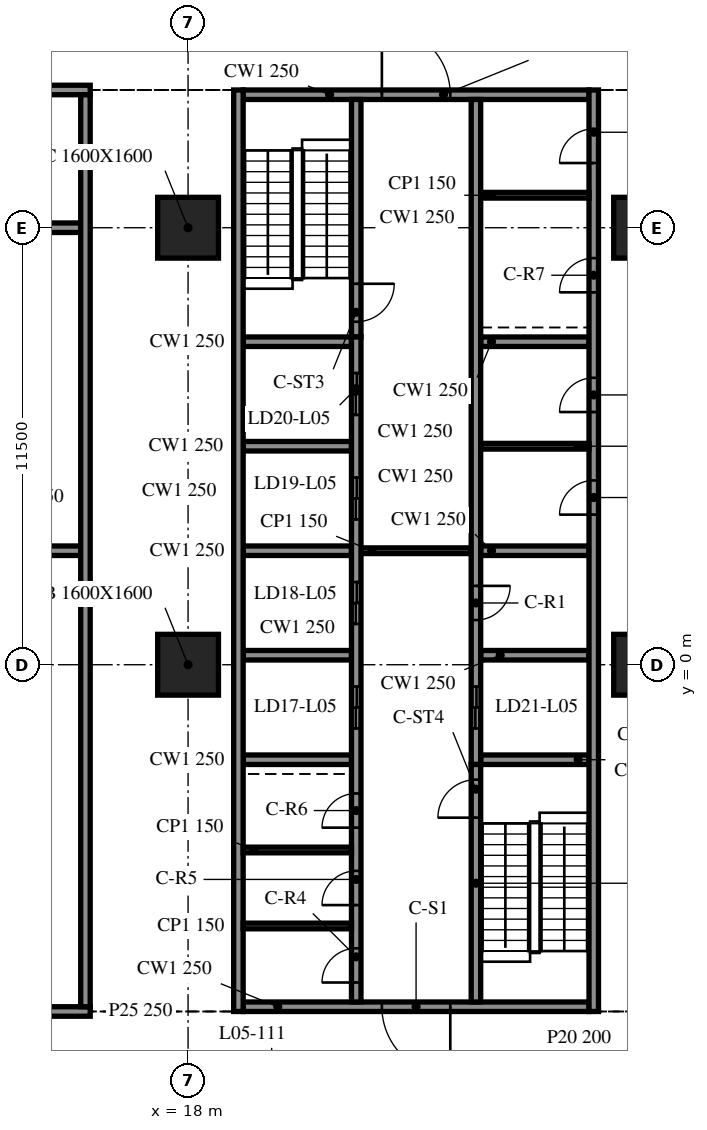
"""IFC4 building model, lengths in metres.
Left out: names, types, materials, properties, quantities, classifications, styles, units other than length and angle.
Written with IfcOpenShell. Run it as: python <this file> out.ifc"""

import sys

from ifc_helpers import new_model, si_unit, direction, frame, frame_2d, origin, origin_2d, place, context, subcontext, project, spatial, rectangle, extrude, element, fill, save


model = new_model("IFC4")
c1 = context("Model", 3, precision=1e-05, world=origin(), true_north=direction((0.0, 1.0)))
c2 = subcontext(c1, "Body", "Model", "MODEL_VIEW")
j1 = project(units=[si_unit("LENGTHUNIT", "METRE"), si_unit("PLANEANGLEUNIT", "RADIAN")], contexts=[c1])
p1 = place(None, origin())
s1 = spatial("IfcSite", under=j1, at=p1, CompositionType="ELEMENT")
p2 = place(p1, origin())
s2 = spatial("IfcBuilding", under=s1, at=p2, CompositionType="ELEMENT")
p3 = place(p2, frame((0.0, 0.0, 24.4)))
s3 = spatial("IfcBuildingStorey", under=s2, at=p3, CompositionType="ELEMENT", Elevation=24.4)
for number, where, z_axis, x_axis in (
    (1, (18.0, 0.0, -0.34), (0.0, 0.0, 1.0), (1.0, 0.0, 0.0)),
    (2, (18.0, 11.5, -0.34), (0.0, 0.0, 1.0), (1.0, 0.0, 0.0)),
    (3, (30.0, 0.0, -0.34), (0.0, 0.0, 1.0), (1.0, 0.0, 0.0)),
    (4, (30.0, 11.5, -0.34), (0.0, 0.0, 1.0), (1.0, 0.0, 0.0)),
):
    element("IfcColumn", number, at=place(p3, frame(where, z_axis=z_axis, x_axis=x_axis)), inside=s3, PredefinedType="COLUMN", context=c2, shape_type="SweptSolid", body=[
        extrude(rectangle(XDim=1.6, YDim=1.6, at=origin_2d()), origin(), (0.0, 0.0, 1.0), 4.3),
    ])
p4 = place(p3, frame((19.325, 15.125, 0.0), z_axis=(0.0, 0.0, 1.0), x_axis=(0.0, -1.0, 0.0)))
e5 = element("IfcWall", 5, at=p4, inside=s3, PredefinedType="SOLIDWALL", context=c2, shape_type="SweptSolid", body=[
    extrude(rectangle(XDim=24.25, YDim=0.25, at=frame_2d((12.125, 0.0))), origin(), (0.0, 0.0, 1.0), 3.96),
])
p5 = place(p3, frame((28.675, -9.125, 0.0), z_axis=(0.0, 0.0, 1.0), x_axis=(0.0, 1.0, 0.0)))
e6 = element("IfcWall", 6, at=p5, inside=s3, PredefinedType="SOLIDWALL", context=c2, shape_type="SweptSolid", body=[
    extrude(rectangle(XDim=24.25, YDim=0.25, at=frame_2d((12.125, 0.0))), origin(), (0.0, 0.0, 1.0), 3.96),
])
p6 = place(p5, frame((13.075, 0.0, 0.0)))
e7 = element("IfcOpeningElement", 7, at=p6, cuts=e6, PredefinedType="OPENING", context=c2, shape_type="SweptSolid", body=[
    extrude(rectangle(XDim=0.9, YDim=2.1, at=frame_2d((0.45, 1.05))), frame((0.0, 0.135, 0.0), z_axis=(0.0, -1.0, 0.0), x_axis=(1.0, 0.0, 0.0)), (0.0, 0.0, 1.0), 0.27),
])
p7 = place(p5, frame((15.775, 0.0, 0.0)))
e8 = element("IfcOpeningElement", 8, at=p7, cuts=e6, PredefinedType="OPENING", context=c2, shape_type="SweptSolid", body=[
    extrude(rectangle(XDim=0.9, YDim=2.1, at=frame_2d((0.45, 1.05))), frame((0.0, 0.135, 0.0), z_axis=(0.0, -1.0, 0.0), x_axis=(1.0, 0.0, 0.0)), (0.0, 0.0, 1.0), 0.27),
])
p8 = place(p5, frame((18.925, 0.0, 0.0)))
e9 = element("IfcOpeningElement", 9, at=p8, cuts=e6, PredefinedType="OPENING", context=c2, shape_type="SweptSolid", body=[
    extrude(rectangle(XDim=0.9, YDim=2.1, at=frame_2d((0.45, 1.05))), frame((0.0, 0.135, 0.0), z_axis=(0.0, -1.0, 0.0), x_axis=(1.0, 0.0, 0.0)), (0.0, 0.0, 1.0), 0.27),
])
p9 = place(p5, frame((22.327, 0.0, 0.0)))
e10 = element("IfcOpeningElement", 10, at=p9, cuts=e6, PredefinedType="OPENING", context=c2, shape_type="SweptSolid", body=[
    extrude(rectangle(XDim=0.9, YDim=2.1, at=frame_2d((0.45, 1.05))), frame((0.0, 0.135, 0.0), z_axis=(0.0, -1.0, 0.0), x_axis=(1.0, 0.0, 0.0)), (0.0, 0.0, 1.0), 0.27),
])
p10 = place(p3, frame((28.55, -9.0, 0.0), z_axis=(0.0, 0.0, 1.0), x_axis=(-1.0, 0.0, 0.0)))
e11 = element("IfcWall", 11, at=p10, inside=s3, PredefinedType="SOLIDWALL", context=c2, shape_type="SweptSolid", body=[
    extrude(rectangle(XDim=9.1, YDim=0.25, at=frame_2d((4.55, 0.0))), origin(), (0.0, 0.0, 1.0), 3.96),
])
p11 = place(p10, frame((3.65, 0.0, 0.0)))
e12 = element("IfcOpeningElement", 12, at=p11, cuts=e11, PredefinedType="OPENING", context=c2, shape_type="SweptSolid", body=[
    extrude(rectangle(XDim=1.8, YDim=2.1, at=frame_2d((0.9, 1.05))), frame((0.0, 0.135, 0.0), z_axis=(0.0, -1.0, 0.0), x_axis=(1.0, 0.0, 0.0)), (0.0, 0.0, 1.0), 0.27),
])
p12 = place(p3, frame((19.45, 15.0, 0.0), z_axis=(0.0, 0.0, 1.0), x_axis=(1.0, 0.0, 0.0)))
e13 = element("IfcWall", 13, at=p12, inside=s3, PredefinedType="SOLIDWALL", context=c2, shape_type="SweptSolid", body=[
    extrude(rectangle(XDim=9.1, YDim=0.25, at=frame_2d((4.55, 0.0))), origin(), (0.0, 0.0, 1.0), 3.96),
])
p13 = place(p12, frame((3.65, 0.0, 0.0)))
e14 = element("IfcOpeningElement", 14, at=p13, cuts=e13, PredefinedType="OPENING", context=c2, shape_type="SweptSolid", body=[
    extrude(rectangle(XDim=1.8, YDim=2.1, at=frame_2d((0.9, 1.05))), frame((0.0, 0.135, 0.0), z_axis=(0.0, -1.0, 0.0), x_axis=(1.0, 0.0, 0.0)), (0.0, 0.0, 1.0), 0.27),
])
p14 = place(p3, frame((22.425, -8.875, 0.0), z_axis=(0.0, 0.0, 1.0), x_axis=(0.0, 1.0, 0.0)))
e15 = element("IfcWall", 15, at=p14, inside=s3, PredefinedType="SOLIDWALL", context=c2, shape_type="SweptSolid", body=[
    extrude(rectangle(XDim=17.5, YDim=0.25, at=frame_2d((8.75, 0.0))), origin(), (0.0, 0.0, 1.0), 3.96),
])
p15 = place(p14, frame((7.2, 0.0, 0.0)))
e16 = element("IfcOpeningElement", 16, at=p15, cuts=e15, PredefinedType="OPENING", context=c2, shape_type="SweptSolid", body=[
    extrude(rectangle(XDim=1.1, YDim=2.1, at=frame_2d((0.55, 1.05))), frame((0.0, 0.135, 0.0), z_axis=(0.0, -1.0, 0.0), x_axis=(1.0, 0.0, 0.0)), (0.0, 0.0, 1.0), 0.27),
])
p16 = place(p14, frame((9.95, 0.0, 0.0)))
e17 = element("IfcOpeningElement", 17, at=p16, cuts=e15, PredefinedType="OPENING", context=c2, shape_type="SweptSolid", body=[
    extrude(rectangle(XDim=1.1, YDim=2.1, at=frame_2d((0.55, 1.05))), frame((0.0, 0.135, 0.0), z_axis=(0.0, -1.0, 0.0), x_axis=(1.0, 0.0, 0.0)), (0.0, 0.0, 1.0), 0.27),
])
p17 = place(p14, frame((12.7, 0.0, 0.0)))
e18 = element("IfcOpeningElement", 18, at=p17, cuts=e15, PredefinedType="OPENING", context=c2, shape_type="SweptSolid", body=[
    extrude(rectangle(XDim=1.1, YDim=2.1, at=frame_2d((0.55, 1.05))), frame((0.0, 0.135, 0.0), z_axis=(0.0, -1.0, 0.0), x_axis=(1.0, 0.0, 0.0)), (0.0, 0.0, 1.0), 0.27),
])
p18 = place(p14, frame((15.45, 0.0, 0.0)))
e19 = element("IfcOpeningElement", 19, at=p18, cuts=e15, PredefinedType="OPENING", context=c2, shape_type="SweptSolid", body=[
    extrude(rectangle(XDim=1.1, YDim=2.1, at=frame_2d((0.55, 1.05))), frame((0.0, 0.135, 0.0), z_axis=(0.0, -1.0, 0.0), x_axis=(1.0, 0.0, 0.0)), (0.0, 0.0, 1.0), 0.27),
])
p19 = place(p14, frame((0.512, 0.0, 0.0)))
e20 = element("IfcOpeningElement", 20, at=p19, cuts=e15, PredefinedType="OPENING", context=c2, shape_type="SweptSolid", body=[
    extrude(rectangle(XDim=0.9, YDim=2.1, at=frame_2d((0.45, 1.05))), frame((0.0, 0.135, 0.0), z_axis=(0.0, -1.0, 0.0), x_axis=(1.0, 0.0, 0.0)), (0.0, 0.0, 1.0), 0.27),
])
p20 = place(p14, frame((2.55, 0.0, 0.0)))
e21 = element("IfcOpeningElement", 21, at=p20, cuts=e15, PredefinedType="OPENING", context=c2, shape_type="SweptSolid", body=[
    extrude(rectangle(XDim=0.9, YDim=2.1, at=frame_2d((0.45, 1.05))), frame((0.0, 0.135, 0.0), z_axis=(0.0, -1.0, 0.0), x_axis=(1.0, 0.0, 0.0)), (0.0, 0.0, 1.0), 0.27),
])
p21 = place(p14, frame((4.587, 0.0, 0.0)))
e22 = element("IfcOpeningElement", 22, at=p21, cuts=e15, PredefinedType="OPENING", context=c2, shape_type="SweptSolid", body=[
    extrude(rectangle(XDim=0.9, YDim=2.1, at=frame_2d((0.45, 1.05))), frame((0.0, 0.135, 0.0), z_axis=(0.0, -1.0, 0.0), x_axis=(1.0, 0.0, 0.0)), (0.0, 0.0, 1.0), 0.27),
])
p22 = place(p3, frame((22.425, 14.875, 0.0), z_axis=(0.0, 0.0, 1.0), x_axis=(0.0, -1.0, 0.0)))
e23 = element("IfcWall", 23, at=p22, inside=s3, PredefinedType="SOLIDWALL", context=c2, shape_type="SweptSolid", body=[
    extrude(rectangle(XDim=6.25, YDim=0.25, at=frame_2d((3.125, 0.0))), origin(), (0.0, 0.0, 1.0), 3.96),
])
p23 = place(p22, frame((4.85, 0.0, 0.0)))
e24 = element("IfcOpeningElement", 24, at=p23, cuts=e23, PredefinedType="OPENING", context=c2, shape_type="SweptSolid", body=[
    extrude(rectangle(XDim=1.0, YDim=2.1, at=frame_2d((0.5, 1.05))), frame((0.0, 0.135, 0.0), z_axis=(0.0, -1.0, 0.0), x_axis=(1.0, 0.0, 0.0)), (0.0, 0.0, 1.0), 0.27),
])
p24 = place(p3, frame((25.575, -8.875, 0.0), z_axis=(0.0, 0.0, 1.0), x_axis=(0.0, 1.0, 0.0)))
e25 = element("IfcWall", 25, at=p24, inside=s3, PredefinedType="SOLIDWALL", context=c2, shape_type="SweptSolid", body=[
    extrude(rectangle(XDim=6.25, YDim=0.25, at=frame_2d((3.125, 0.0))), origin(), (0.0, 0.0, 1.0), 3.96),
])
p25 = place(p24, frame((4.85, 0.0, 0.0)))
e26 = element("IfcOpeningElement", 26, at=p25, cuts=e25, PredefinedType="OPENING", context=c2, shape_type="SweptSolid", body=[
    extrude(rectangle(XDim=1.0, YDim=2.1, at=frame_2d((0.5, 1.05))), frame((0.0, 0.135, 0.0), z_axis=(0.0, -1.0, 0.0), x_axis=(1.0, 0.0, 0.0)), (0.0, 0.0, 1.0), 0.27),
])
p26 = place(p3, frame((25.575, 14.875, 0.0), z_axis=(0.0, 0.0, 1.0), x_axis=(0.0, -1.0, 0.0)))
e27 = element("IfcWall", 27, at=p26, inside=s3, PredefinedType="SOLIDWALL", context=c2, shape_type="SweptSolid", body=[
    extrude(rectangle(XDim=17.5, YDim=0.25, at=frame_2d((8.75, 0.0))), origin(), (0.0, 0.0, 1.0), 3.96),
])
p27 = place(p26, frame((15.45, 0.0, 0.0)))
e28 = element("IfcOpeningElement", 28, at=p27, cuts=e27, PredefinedType="OPENING", context=c2, shape_type="SweptSolid", body=[
    extrude(rectangle(XDim=1.1, YDim=2.1, at=frame_2d((0.55, 1.05))), frame((0.0, 0.135, 0.0), z_axis=(0.0, -1.0, 0.0), x_axis=(1.0, 0.0, 0.0)), (0.0, 0.0, 1.0), 0.27),
])
p28 = place(p26, frame((12.8, 0.0, 0.0)))
e29 = element("IfcOpeningElement", 29, at=p28, cuts=e27, PredefinedType="OPENING", context=c2, shape_type="SweptSolid", body=[
    extrude(rectangle(XDim=0.9, YDim=2.1, at=frame_2d((0.45, 1.05))), frame((0.0, 0.135, 0.0), z_axis=(0.0, -1.0, 0.0), x_axis=(1.0, 0.0, 0.0)), (0.0, 0.0, 1.0), 0.27),
])
for number, where, z_axis, x_axis in (
    (30, (19.45, -2.5, 0.0), (0.0, 0.0, 1.0), (1.0, 0.0, 0.0)),
    (31, (19.45, 0.25, 0.0), (0.0, 0.0, 1.0), (1.0, 0.0, 0.0)),
    (32, (19.45, 3.0, 0.0), (0.0, 0.0, 1.0), (1.0, 0.0, 0.0)),
    (33, (19.45, 5.75, 0.0), (0.0, 0.0, 1.0), (1.0, 0.0, 0.0)),
    (34, (19.45, 8.5, 0.0), (0.0, 0.0, 1.0), (1.0, 0.0, 0.0)),
    (35, (25.7, -2.5, 0.0), (0.0, 0.0, 1.0), (1.0, 0.0, 0.0)),
    (36, (25.7, 0.25, 0.0), (0.0, 0.0, 1.0), (1.0, 0.0, 0.0)),
    (37, (25.7, 3.0, 0.0), (0.0, 0.0, 1.0), (1.0, 0.0, 0.0)),
    (38, (25.7, 8.5, 0.0), (0.0, 0.0, 1.0), (1.0, 0.0, 0.0)),
):
    element("IfcWall", number, at=place(p3, frame(where, z_axis=z_axis, x_axis=x_axis)), inside=s3, PredefinedType="SOLIDWALL", context=c2, shape_type="SweptSolid", body=[
        extrude(rectangle(XDim=2.85, YDim=0.25, at=frame_2d((1.425, 0.0))), origin(), (0.0, 0.0, 1.0), 3.96),
    ])
p29 = place(p3, frame((22.55, 3.0, 0.0), z_axis=(0.0, 0.0, 1.0), x_axis=(1.0, 0.0, 0.0)))
e39 = element("IfcWall", 39, at=p29, inside=s3, PredefinedType="PARTITIONING", context=c2, shape_type="SweptSolid", body=[
    extrude(rectangle(XDim=2.9, YDim=0.15, at=frame_2d((1.45, 0.0))), origin(), (0.0, 0.0, 1.0), 3.96),
])
for number, where, z_axis, x_axis in (
    (40, (25.7, 5.75, 0.0), (0.0, 0.0, 1.0), (1.0, 0.0, 0.0)),
    (41, (19.45, -6.875, 0.0), (0.0, 0.0, 1.0), (1.0, 0.0, 0.0)),
    (42, (19.45, -4.875, 0.0), (0.0, 0.0, 1.0), (1.0, 0.0, 0.0)),
    (43, (25.7, 12.355, 0.0), (0.0, 0.0, 1.0), (1.0, 0.0, 0.0)),
):
    element("IfcWall", number, at=place(p3, frame(where, z_axis=z_axis, x_axis=x_axis)), inside=s3, PredefinedType="PARTITIONING", context=c2, shape_type="SweptSolid", body=[
        extrude(rectangle(XDim=2.85, YDim=0.15, at=frame_2d((1.425, 0.0))), origin(), (0.0, 0.0, 1.0), 3.96),
    ])
p30 = place(p3, frame((8.475, -9.125, 0.0), z_axis=(0.0, 0.0, 1.0), x_axis=(1.0, 0.0, 0.0)))
e44 = element("IfcWall", 44, at=p30, inside=s3, PredefinedType="PARTITIONING", context=c2, shape_type="SweptSolid", body=[
    extrude(rectangle(XDim=6.95, YDim=0.25, at=frame_2d((3.475, 0.0))), origin(), (0.0, 0.0, 1.0), 3.96),
])
p31 = place(p30, frame((3.1, 0.0, 0.0)))
e45 = element("IfcOpeningElement", 45, at=p31, cuts=e44, PredefinedType="OPENING", context=c2, shape_type="SweptSolid", body=[
    extrude(rectangle(XDim=0.9, YDim=2.1, at=frame_2d((0.45, 1.05))), frame((0.0, 0.135, 0.0), z_axis=(0.0, -1.0, 0.0), x_axis=(1.0, 0.0, 0.0)), (0.0, 0.0, 1.0), 0.27),
])
for number, where, z_axis, x_axis in (
    (46, (8.725, 3.0, 0.0), (0.0, 0.0, 1.0), (1.0, 0.0, 0.0)),
    (47, (8.725, 11.5, 0.0), (0.0, 0.0, 1.0), (1.0, 0.0, 0.0)),
):
    element("IfcWall", number, at=place(p3, frame(where, z_axis=z_axis, x_axis=x_axis)), inside=s3, PredefinedType="PARTITIONING", context=c2, shape_type="SweptSolid", body=[
        extrude(rectangle(XDim=6.45, YDim=0.25, at=frame_2d((3.225, 0.0))), origin(), (0.0, 0.0, 1.0), 3.96),
    ])
p32 = place(p3, frame((8.475, 15.125, 0.0), z_axis=(0.0, 0.0, 1.0), x_axis=(1.0, 0.0, 0.0)))
e48 = element("IfcWall", 48, at=p32, inside=s3, PredefinedType="PARTITIONING", context=c2, shape_type="SweptSolid", body=[
    extrude(rectangle(XDim=6.95, YDim=0.25, at=frame_2d((3.475, 0.0))), origin(), (0.0, 0.0, 1.0), 3.96),
])
p33 = place(p32, frame((3.1, 0.0, 0.0)))
e49 = element("IfcOpeningElement", 49, at=p33, cuts=e48, PredefinedType="OPENING", context=c2, shape_type="SweptSolid", body=[
    extrude(rectangle(XDim=0.9, YDim=2.1, at=frame_2d((0.45, 1.05))), frame((0.0, 0.135, 0.0), z_axis=(0.0, -1.0, 0.0), x_axis=(1.0, 0.0, 0.0)), (0.0, 0.0, 1.0), 0.27),
])
p34 = place(p3, frame((15.3, -9.0, 0.0), z_axis=(0.0, 0.0, 1.0), x_axis=(0.0, 1.0, 0.0)))
e50 = element("IfcWall", 50, at=p34, inside=s3, PredefinedType="PARTITIONING", context=c2, shape_type="SweptSolid", body=[
    extrude(rectangle(XDim=24.0, YDim=0.25, at=frame_2d((12.0, 0.0))), origin(), (0.0, 0.0, 1.0), 3.96),
])
p35 = place(p11, origin())
e51 = element("IfcDoor", 51, at=p35, inside=s3, OperationType="DOUBLE_DOOR_SINGLE_SWING", PredefinedType="DOOR", context=c2, shape_type="SweptSolid", body=[
    extrude(rectangle(XDim=1.8, YDim=2.1, at=frame_2d((0.9, 1.05))), frame((0.0, 0.025, 0.0), z_axis=(0.0, -1.0, 0.0), x_axis=(1.0, 0.0, 0.0)), (0.0, 0.0, 1.0), 0.05),
])
fill(e12, e51)
p36 = place(p13, origin())
e52 = element("IfcDoor", 52, at=p36, inside=s3, OperationType="DOUBLE_DOOR_SINGLE_SWING", PredefinedType="DOOR", context=c2, shape_type="SweptSolid", body=[
    extrude(rectangle(XDim=1.8, YDim=2.1, at=frame_2d((0.9, 1.05))), frame((0.0, 0.025, 0.0), z_axis=(0.0, -1.0, 0.0), x_axis=(1.0, 0.0, 0.0)), (0.0, 0.0, 1.0), 0.05),
])
fill(e14, e52)
p37 = place(p27, origin())
e53 = element("IfcDoor", 53, at=p37, inside=s3, OperationType="DOUBLE_DOOR_SLIDING", PredefinedType="DOOR", context=c2, shape_type="SweptSolid", body=[
    extrude(rectangle(XDim=1.1, YDim=2.1, at=frame_2d((0.55, 1.05))), frame((0.0, 0.025, 0.0), z_axis=(0.0, -1.0, 0.0), x_axis=(1.0, 0.0, 0.0)), (0.0, 0.0, 1.0), 0.05),
])
fill(e28, e53)
p38 = place(p15, origin())
e54 = element("IfcDoor", 54, at=p38, inside=s3, OperationType="DOUBLE_DOOR_SLIDING", PredefinedType="DOOR", context=c2, shape_type="SweptSolid", body=[
    extrude(rectangle(XDim=1.1, YDim=2.1, at=frame_2d((0.55, 1.05))), frame((0.0, 0.025, 0.0), z_axis=(0.0, -1.0, 0.0), x_axis=(1.0, 0.0, 0.0)), (0.0, 0.0, 1.0), 0.05),
])
fill(e16, e54)
p39 = place(p16, origin())
e55 = element("IfcDoor", 55, at=p39, inside=s3, OperationType="DOUBLE_DOOR_SLIDING", PredefinedType="DOOR", context=c2, shape_type="SweptSolid", body=[
    extrude(rectangle(XDim=1.1, YDim=2.1, at=frame_2d((0.55, 1.05))), frame((0.0, 0.025, 0.0), z_axis=(0.0, -1.0, 0.0), x_axis=(1.0, 0.0, 0.0)), (0.0, 0.0, 1.0), 0.05),
])
fill(e17, e55)
p40 = place(p17, origin())
e56 = element("IfcDoor", 56, at=p40, inside=s3, OperationType="DOUBLE_DOOR_SLIDING", PredefinedType="DOOR", context=c2, shape_type="SweptSolid", body=[
    extrude(rectangle(XDim=1.1, YDim=2.1, at=frame_2d((0.55, 1.05))), frame((0.0, 0.025, 0.0), z_axis=(0.0, -1.0, 0.0), x_axis=(1.0, 0.0, 0.0)), (0.0, 0.0, 1.0), 0.05),
])
fill(e18, e56)
p41 = place(p18, origin())
e57 = element("IfcDoor", 57, at=p41, inside=s3, OperationType="DOUBLE_DOOR_SLIDING", PredefinedType="DOOR", context=c2, shape_type="SweptSolid", body=[
    extrude(rectangle(XDim=1.1, YDim=2.1, at=frame_2d((0.55, 1.05))), frame((0.0, 0.025, 0.0), z_axis=(0.0, -1.0, 0.0), x_axis=(1.0, 0.0, 0.0)), (0.0, 0.0, 1.0), 0.05),
])
fill(e19, e57)
p42 = place(p28, origin())
e58 = element("IfcDoor", 58, at=p42, inside=s3, OperationType="SINGLE_SWING_LEFT", PredefinedType="DOOR", context=c2, shape_type="SweptSolid", body=[
    extrude(rectangle(XDim=0.9, YDim=2.1, at=frame_2d((0.45, 1.05))), frame((0.0, 0.025, 0.0), z_axis=(0.0, -1.0, 0.0), x_axis=(1.0, 0.0, 0.0)), (0.0, 0.0, 1.0), 0.05),
])
fill(e29, e58)
p43 = place(p6, origin())
e59 = element("IfcDoor", 59, at=p43, inside=s3, OperationType="SINGLE_SWING_RIGHT", PredefinedType="DOOR", context=c2, shape_type="SweptSolid", body=[
    extrude(rectangle(XDim=0.9, YDim=2.1, at=frame_2d((0.45, 1.05))), frame((0.0, 0.025, 0.0), z_axis=(0.0, -1.0, 0.0), x_axis=(1.0, 0.0, 0.0)), (0.0, 0.0, 1.0), 0.05),
])
fill(e7, e59)
p44 = place(p7, origin())
e60 = element("IfcDoor", 60, at=p44, inside=s3, OperationType="SINGLE_SWING_LEFT", PredefinedType="DOOR", context=c2, shape_type="SweptSolid", body=[
    extrude(rectangle(XDim=0.9, YDim=2.1, at=frame_2d((0.45, 1.05))), frame((0.0, 0.025, 0.0), z_axis=(0.0, -1.0, 0.0), x_axis=(1.0, 0.0, 0.0)), (0.0, 0.0, 1.0), 0.05),
])
fill(e8, e60)
p45 = place(p19, origin())
e61 = element("IfcDoor", 61, at=p45, inside=s3, OperationType="SINGLE_SWING_RIGHT", PredefinedType="DOOR", context=c2, shape_type="SweptSolid", body=[
    extrude(rectangle(XDim=0.9, YDim=2.1, at=frame_2d((0.45, 1.05))), frame((0.0, 0.025, 0.0), z_axis=(0.0, -1.0, 0.0), x_axis=(1.0, 0.0, 0.0)), (0.0, 0.0, 1.0), 0.05),
])
fill(e20, e61)
p46 = place(p20, origin())
e62 = element("IfcDoor", 62, at=p46, inside=s3, OperationType="SINGLE_SWING_LEFT", PredefinedType="DOOR", context=c2, shape_type="SweptSolid", body=[
    extrude(rectangle(XDim=0.9, YDim=2.1, at=frame_2d((0.45, 1.05))), frame((0.0, 0.025, 0.0), z_axis=(0.0, -1.0, 0.0), x_axis=(1.0, 0.0, 0.0)), (0.0, 0.0, 1.0), 0.05),
])
fill(e21, e62)
p47 = place(p21, origin())
e63 = element("IfcDoor", 63, at=p47, inside=s3, OperationType="SINGLE_SWING_RIGHT", PredefinedType="DOOR", context=c2, shape_type="SweptSolid", body=[
    extrude(rectangle(XDim=0.9, YDim=2.1, at=frame_2d((0.45, 1.05))), frame((0.0, 0.025, 0.0), z_axis=(0.0, -1.0, 0.0), x_axis=(1.0, 0.0, 0.0)), (0.0, 0.0, 1.0), 0.05),
])
fill(e22, e63)
p48 = place(p8, origin())
e64 = element("IfcDoor", 64, at=p48, inside=s3, OperationType="SINGLE_SWING_LEFT", PredefinedType="DOOR", context=c2, shape_type="SweptSolid", body=[
    extrude(rectangle(XDim=0.9, YDim=2.1, at=frame_2d((0.45, 1.05))), frame((0.0, 0.025, 0.0), z_axis=(0.0, -1.0, 0.0), x_axis=(1.0, 0.0, 0.0)), (0.0, 0.0, 1.0), 0.05),
])
fill(e9, e64)
p49 = place(p9, origin())
e65 = element("IfcDoor", 65, at=p49, inside=s3, OperationType="SINGLE_SWING_RIGHT", PredefinedType="DOOR", context=c2, shape_type="SweptSolid", body=[
    extrude(rectangle(XDim=0.9, YDim=2.1, at=frame_2d((0.45, 1.05))), frame((0.0, 0.025, 0.0), z_axis=(0.0, -1.0, 0.0), x_axis=(1.0, 0.0, 0.0)), (0.0, 0.0, 1.0), 0.05),
])
fill(e10, e65)
p50 = place(p23, origin())
e66 = element("IfcDoor", 66, at=p50, inside=s3, OperationType="SINGLE_SWING_LEFT", PredefinedType="DOOR", context=c2, shape_type="SweptSolid", body=[
    extrude(rectangle(XDim=1.0, YDim=2.1, at=frame_2d((0.5, 1.05))), frame((0.0, 0.025, 0.0), z_axis=(0.0, -1.0, 0.0), x_axis=(1.0, 0.0, 0.0)), (0.0, 0.0, 1.0), 0.05),
])
fill(e24, e66)
p51 = place(p25, origin())
e67 = element("IfcDoor", 67, at=p51, inside=s3, OperationType="SINGLE_SWING_RIGHT", PredefinedType="DOOR", context=c2, shape_type="SweptSolid", body=[
    extrude(rectangle(XDim=1.0, YDim=2.1, at=frame_2d((0.5, 1.05))), frame((0.0, 0.025, 0.0), z_axis=(0.0, -1.0, 0.0), x_axis=(1.0, 0.0, 0.0)), (0.0, 0.0, 1.0), 0.05),
])
fill(e26, e67)
save(model, sys.argv[1])
